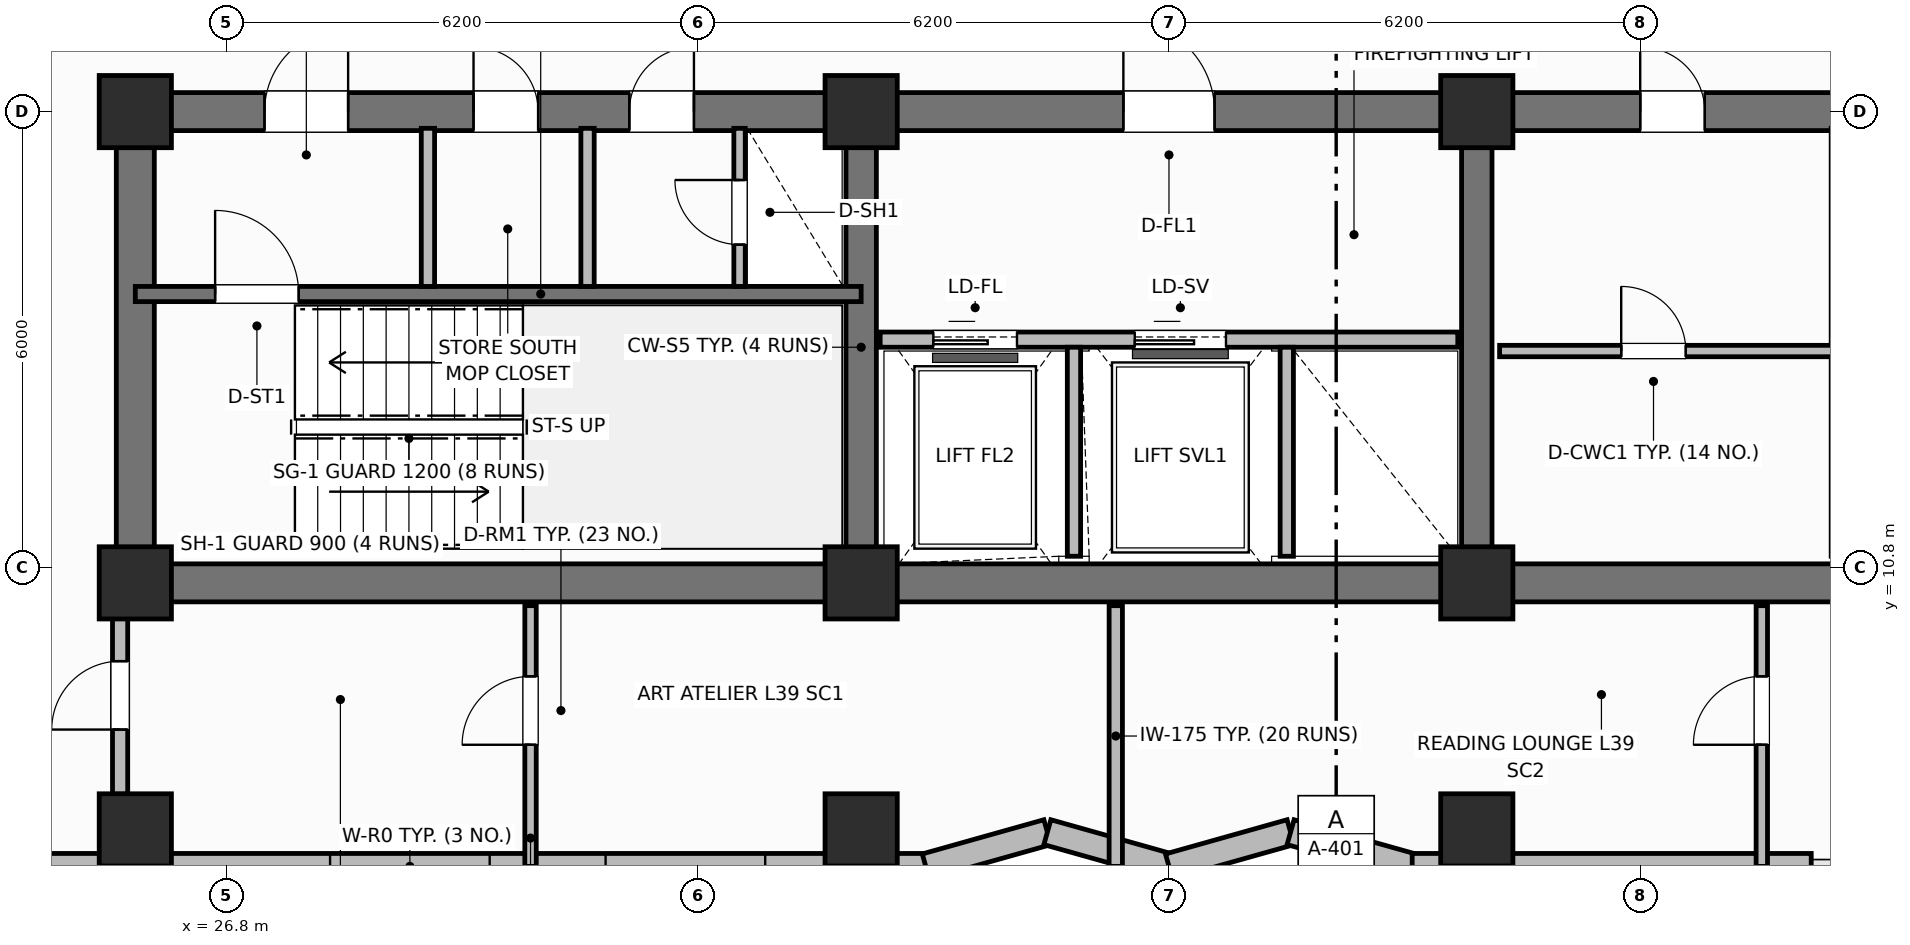
"""IFC4 building model, lengths in metres.
Left out: names, types, materials, properties, quantities, classifications, styles, units other than length and angle.
Written with IfcOpenShell. Run it as: python <this file> out.ifc"""

import sys

from ifc_helpers import new_model, si_unit, direction, frame, frame_2d, origin, origin_2d, place, context, subcontext, project, spatial, rectangle, extrude, element, fill, save


model = new_model("IFC4")
c1 = context("Model", 3, precision=1e-05, world=origin(), true_north=direction((0.0, 1.0)))
c2 = subcontext(c1, "Body", "Model", "MODEL_VIEW")
j1 = project(units=[si_unit("LENGTHUNIT", "METRE"), si_unit("PLANEANGLEUNIT", "RADIAN")], contexts=[c1])
p1 = place(None, origin())
s1 = spatial("IfcSite", under=j1, at=p1, CompositionType="ELEMENT")
p2 = place(p1, origin())
s2 = spatial("IfcBuilding", under=s1, at=p2, CompositionType="ELEMENT")
p3 = place(p2, frame((0.0, 0.0, 158.9)))
s3 = spatial("IfcBuildingStorey", under=s2, at=p3, CompositionType="ELEMENT", Elevation=158.9)
p4 = place(p3, frame((52.8, 10.6, 0.0), z_axis=(0.0, 0.0, 1.0), x_axis=(-1.0, 0.0, 0.0)))
e1 = element("IfcWall", 1, at=p4, inside=s3, PredefinedType="SHEAR", context=c2, shape_type="SweptSolid", body=[
    extrude(rectangle(XDim=27.2, YDim=0.5, at=frame_2d((13.6, 0.0))), origin(), (0.0, 0.0, 1.0), 3.7),
])
p5 = place(p3, frame((25.6, 10.85, 0.0), z_axis=(0.0, 0.0, 1.0), x_axis=(0.0, 1.0, 0.0)))
e2 = element("IfcWall", 2, at=p5, inside=s3, PredefinedType="SHEAR", context=c2, shape_type="SweptSolid", body=[
    extrude(rectangle(XDim=5.7, YDim=0.5, at=frame_2d((2.85, 0.0))), origin(), (0.0, 0.0, 1.0), 3.7),
])
p6 = place(p3, frame((25.6, 16.8, 0.0), z_axis=(0.0, 0.0, 1.0), x_axis=(1.0, 0.0, 0.0)))
e3 = element("IfcWall", 3, at=p6, inside=s3, PredefinedType="SHEAR", context=c2, shape_type="SweptSolid", body=[
    extrude(rectangle(XDim=27.2, YDim=0.5, at=frame_2d((13.6, 0.0))), origin(), (0.0, 0.0, 1.0), 3.7),
])
p7 = place(p6, frame((1.7, 0.0, 0.0)))
e4 = element("IfcOpeningElement", 4, at=p7, cuts=e3, PredefinedType="OPENING", context=c2, shape_type="SweptSolid", body=[
    extrude(rectangle(XDim=1.1, YDim=2.15, at=frame_2d((0.55, 1.075))), frame((0.0, 0.26, 0.0), z_axis=(0.0, -1.0, 0.0), x_axis=(1.0, 0.0, 0.0)), (0.0, 0.0, 1.0), 0.52),
])
p8 = place(p6, frame((4.45, 0.0, 0.0)))
e5 = element("IfcOpeningElement", 5, at=p8, cuts=e3, PredefinedType="OPENING", context=c2, shape_type="SweptSolid", body=[
    extrude(rectangle(XDim=0.85, YDim=2.1, at=frame_2d((0.425, 1.05))), frame((0.0, 0.26, 0.0), z_axis=(0.0, -1.0, 0.0), x_axis=(1.0, 0.0, 0.0)), (0.0, 0.0, 1.0), 0.52),
])
p9 = place(p6, frame((6.5, 0.0, 0.0)))
e6 = element("IfcOpeningElement", 6, at=p9, cuts=e3, PredefinedType="OPENING", context=c2, shape_type="SweptSolid", body=[
    extrude(rectangle(XDim=0.85, YDim=2.1, at=frame_2d((0.425, 1.05))), frame((0.0, 0.26, 0.0), z_axis=(0.0, -1.0, 0.0), x_axis=(1.0, 0.0, 0.0)), (0.0, 0.0, 1.0), 0.52),
])
p10 = place(p6, frame((13.0, 0.0, 0.0)))
e7 = element("IfcOpeningElement", 7, at=p10, cuts=e3, PredefinedType="OPENING", context=c2, shape_type="SweptSolid", body=[
    extrude(rectangle(XDim=1.2, YDim=2.15, at=frame_2d((0.6, 1.075))), frame((0.0, 0.26, 0.0), z_axis=(0.0, -1.0, 0.0), x_axis=(1.0, 0.0, 0.0)), (0.0, 0.0, 1.0), 0.52),
])
p11 = place(p6, frame((19.8, 0.0, 0.0)))
e8 = element("IfcOpeningElement", 8, at=p11, cuts=e3, PredefinedType="OPENING", context=c2, shape_type="SweptSolid", body=[
    extrude(rectangle(XDim=0.85, YDim=2.1, at=frame_2d((0.425, 1.05))), frame((0.0, 0.26, 0.0), z_axis=(0.0, -1.0, 0.0), x_axis=(1.0, 0.0, 0.0)), (0.0, 0.0, 1.0), 0.52),
])
p12 = place(p6, frame((24.2, 0.0, 0.0)))
e9 = element("IfcOpeningElement", 9, at=p12, cuts=e3, PredefinedType="OPENING", context=c2, shape_type="SweptSolid", body=[
    extrude(rectangle(XDim=0.85, YDim=2.1, at=frame_2d((0.425, 1.05))), frame((0.0, 0.26, 0.0), z_axis=(0.0, -1.0, 0.0), x_axis=(1.0, 0.0, 0.0)), (0.0, 0.0, 1.0), 0.52),
])
for number, where, z_axis, x_axis in (
    (10, (35.15, 10.85, 0.0), (0.0, 0.0, 1.0), (0.0, 1.0, 0.0)),
    (11, (43.25, 10.85, 0.0), (0.0, 0.0, 1.0), (0.0, 1.0, 0.0)),
):
    element("IfcWall", number, at=place(p3, frame(where, z_axis=z_axis, x_axis=x_axis)), inside=s3, PredefinedType="SHEAR", context=c2, shape_type="SweptSolid", body=[
        extrude(rectangle(XDim=5.7, YDim=0.4, at=frame_2d((2.85, 0.0))), origin(), (0.0, 0.0, 1.0), 3.7),
    ])
for number, where, z_axis, x_axis in (
    (12, (25.6, 10.6, 0.0), (0.0, 0.0, 1.0), (1.0, 0.0, 0.0)),
    (13, (25.6, 16.8, 0.0), (0.0, 0.0, 1.0), (1.0, 0.0, 0.0)),
    (14, (35.15, 10.6, 0.0), (0.0, 0.0, 1.0), (1.0, 0.0, 0.0)),
    (15, (35.15, 16.8, 0.0), (0.0, 0.0, 1.0), (1.0, 0.0, 0.0)),
    (16, (43.25, 10.6, 0.0), (0.0, 0.0, 1.0), (1.0, 0.0, 0.0)),
    (17, (43.25, 16.8, 0.0), (0.0, 0.0, 1.0), (1.0, 0.0, 0.0)),
    (18, (25.6, 7.35, 0.0), (0.0, 0.0, 1.0), (1.0, 0.0, 0.0)),
    (19, (35.15, 7.35, 0.0), (0.0, 0.0, 1.0), (1.0, 0.0, 0.0)),
    (20, (43.25, 7.35, 0.0), (0.0, 0.0, 1.0), (1.0, 0.0, 0.0)),
):
    element("IfcColumn", number, at=place(p3, frame(where, z_axis=z_axis, x_axis=x_axis)), inside=s3, PredefinedType="COLUMN", context=c2, shape_type="SweptSolid", body=[
        extrude(rectangle(XDim=0.95, YDim=0.95, at=origin_2d()), origin(), (0.0, 0.0, 1.0), 3.7),
    ])
p13 = place(p3, frame((20.2, 6.87, 0.0), z_axis=(0.0, 0.0, 1.0), x_axis=(1.0, 0.0, 0.0)))
e21 = element("IfcWall", 21, at=p13, inside=s3, PredefinedType="SOLIDWALL", context=c2, shape_type="SweptSolid", body=[
    extrude(rectangle(XDim=15.8, YDim=0.34, at=frame_2d((7.9, 0.0))), origin(), (0.0, 0.0, 1.0), 2.72),
])
p14 = place(p13, frame((7.962, 0.0, 0.7)))
e22 = element("IfcOpeningElement", 22, at=p14, cuts=e21, PredefinedType="OPENING", context=c2, shape_type="SweptSolid", body=[
    extrude(rectangle(XDim=2.1, YDim=1.9, at=frame_2d((1.05, 0.95))), frame((0.0, 0.18, 0.0), z_axis=(0.0, -1.0, 0.0), x_axis=(1.0, 0.0, 0.0)), (0.0, 0.0, 1.0), 0.36),
])
p15 = place(p13, frame((11.587, 0.0, 0.7)))
e23 = element("IfcOpeningElement", 23, at=p15, cuts=e21, PredefinedType="OPENING", context=c2, shape_type="SweptSolid", body=[
    extrude(rectangle(XDim=2.1, YDim=1.9, at=frame_2d((1.05, 0.95))), frame((0.0, 0.18, 0.0), z_axis=(0.0, -1.0, 0.0), x_axis=(1.0, 0.0, 0.0)), (0.0, 0.0, 1.0), 0.36),
])
p16 = place(p3, frame((36.0, 6.87, 0.0), z_axis=(0.0, 0.0, 1.0), x_axis=(0.962662902433, 0.270703040766, 0.0)))
e24 = element("IfcWall", 24, at=p16, inside=s3, PredefinedType="SOLIDWALL", context=c2, shape_type="SweptSolid", body=[
    extrude(rectangle(XDim=1.662, YDim=0.34, at=frame_2d((0.831, 0.0))), origin(), (0.0, 0.0, 1.0), 2.72),
])
p17 = place(p3, frame((37.6, 7.32, 0.0), z_axis=(0.0, 0.0, 1.0), x_axis=(0.962652136636, -0.270741322725, 0.0)))
e25 = element("IfcWall", 25, at=p17, inside=s3, PredefinedType="SOLIDWALL", context=c2, shape_type="SweptSolid", body=[
    extrude(rectangle(XDim=1.662, YDim=0.34, at=frame_2d((0.831, 0.0))), origin(), (0.0, 0.0, 1.0), 2.72),
])
p18 = place(p3, frame((39.2, 6.87, 0.0), z_axis=(0.0, 0.0, 1.0), x_axis=(0.962662902433, 0.270703040766, 0.0)))
e26 = element("IfcWall", 26, at=p18, inside=s3, PredefinedType="SOLIDWALL", context=c2, shape_type="SweptSolid", body=[
    extrude(rectangle(XDim=1.662, YDim=0.34, at=frame_2d((0.831, 0.0))), origin(), (0.0, 0.0, 1.0), 2.72),
])
p19 = place(p3, frame((40.8, 7.32, 0.0), z_axis=(0.0, 0.0, 1.0), x_axis=(0.962652136636, -0.270741322725, 0.0)))
e27 = element("IfcWall", 27, at=p19, inside=s3, PredefinedType="SOLIDWALL", context=c2, shape_type="SweptSolid", body=[
    extrude(rectangle(XDim=1.662, YDim=0.34, at=frame_2d((0.831, 0.0))), origin(), (0.0, 0.0, 1.0), 2.72),
])
p20 = place(p3, frame((42.4, 6.87, 0.0), z_axis=(0.0, 0.0, 1.0), x_axis=(1.0, 0.0, 0.0)))
e28 = element("IfcWall", 28, at=p20, inside=s3, PredefinedType="SOLIDWALL", context=c2, shape_type="SweptSolid", body=[
    extrude(rectangle(XDim=5.25, YDim=0.34, at=frame_2d((2.625, 0.0))), origin(), (0.0, 0.0, 1.0), 2.72),
])
p21 = place(p3, frame((25.6, 14.4, 0.0), z_axis=(0.0, 0.0, 1.0), x_axis=(1.0, 0.0, 0.0)))
e29 = element("IfcWall", 29, at=p21, inside=s3, PredefinedType="SHEAR", context=c2, shape_type="SweptSolid", body=[
    extrude(rectangle(XDim=9.55, YDim=0.2, at=frame_2d((4.775, 0.0))), origin(), (0.0, 0.0, 1.0), 3.7),
])
p22 = place(p21, frame((1.05, 0.0, 0.0)))
e30 = element("IfcOpeningElement", 30, at=p22, cuts=e29, PredefinedType="OPENING", context=c2, shape_type="SweptSolid", body=[
    extrude(rectangle(XDim=1.1, YDim=2.15, at=frame_2d((0.55, 1.075))), frame((0.0, 0.11, 0.0), z_axis=(0.0, -1.0, 0.0), x_axis=(1.0, 0.0, 0.0)), (0.0, 0.0, 1.0), 0.22),
])
for number, where, z_axis, x_axis in (
    (31, (29.45, 14.5, 0.0), (0.0, 0.0, 1.0), (0.0, 1.0, 0.0)),
    (32, (31.55, 14.5, 0.0), (0.0, 0.0, 1.0), (0.0, 1.0, 0.0)),
):
    element("IfcWall", number, at=place(p3, frame(where, z_axis=z_axis, x_axis=x_axis)), inside=s3, PredefinedType="PARTITIONING", context=c2, shape_type="SweptSolid", body=[
        extrude(rectangle(XDim=2.08, YDim=0.175, at=frame_2d((1.04, 0.0))), origin(), (0.0, 0.0, 1.0), 2.55),
    ])
p23 = place(p3, frame((33.55, 14.5, 0.0), z_axis=(0.0, 0.0, 1.0), x_axis=(0.0, 1.0, 0.0)))
e33 = element("IfcWall", 33, at=p23, inside=s3, PredefinedType="PARTITIONING", context=c2, shape_type="SweptSolid", body=[
    extrude(rectangle(XDim=2.08, YDim=0.15, at=frame_2d((1.04, 0.0))), origin(), (0.0, 0.0, 1.0), 2.55),
])
p24 = place(p23, frame((0.55, 0.0, 0.0)))
e34 = element("IfcOpeningElement", 34, at=p24, cuts=e33, PredefinedType="OPENING", context=c2, shape_type="SweptSolid", body=[
    extrude(rectangle(XDim=0.85, YDim=2.05, at=frame_2d((0.425, 1.025))), frame((0.0, 0.085, 0.0), z_axis=(0.0, -1.0, 0.0), x_axis=(1.0, 0.0, 0.0)), (0.0, 0.0, 1.0), 0.17),
])
p25 = place(p3, frame((35.4, 13.8, 0.0), z_axis=(0.0, 0.0, 1.0), x_axis=(1.0, 0.0, 0.0)))
e35 = element("IfcWall", 35, at=p25, inside=s3, PredefinedType="PARTITIONING", context=c2, shape_type="SweptSolid", body=[
    extrude(rectangle(XDim=7.6, YDim=0.2, at=frame_2d((3.8, 0.0))), origin(), (0.0, 0.0, 1.0), 2.32),
])
p26 = place(p25, frame((0.7, 0.0, 0.0)))
e36 = element("IfcOpeningElement", 36, at=p26, cuts=e35, PredefinedType="OPENING", context=c2, shape_type="SweptSolid", body=[
    extrude(rectangle(XDim=1.1, YDim=2.15, at=frame_2d((0.55, 1.075))), frame((0.0, 0.11, 0.0), z_axis=(0.0, -1.0, 0.0), x_axis=(1.0, 0.0, 0.0)), (0.0, 0.0, 1.0), 0.22),
])
p27 = place(p25, frame((3.35, 0.0, 0.0)))
e37 = element("IfcOpeningElement", 37, at=p27, cuts=e35, PredefinedType="OPENING", context=c2, shape_type="SweptSolid", body=[
    extrude(rectangle(XDim=1.2, YDim=2.15, at=frame_2d((0.6, 1.075))), frame((0.0, 0.11, 0.0), z_axis=(0.0, -1.0, 0.0), x_axis=(1.0, 0.0, 0.0)), (0.0, 0.0, 1.0), 0.22),
])
for number, where, z_axis, x_axis in (
    (38, (37.95, 10.95, 0.0), (0.0, 0.0, 1.0), (0.0, 1.0, 0.0)),
    (39, (40.75, 10.95, 0.0), (0.0, 0.0, 1.0), (0.0, 1.0, 0.0)),
):
    element("IfcWall", number, at=place(p3, frame(where, z_axis=z_axis, x_axis=x_axis)), inside=s3, PredefinedType="PARTITIONING", context=c2, shape_type="SweptSolid", body=[
        extrude(rectangle(XDim=2.75, YDim=0.175, at=frame_2d((1.375, 0.0))), origin(), (0.0, 0.0, 1.0), 2.55),
    ])
p28 = place(p3, frame((43.55, 13.65, 0.0), z_axis=(0.0, 0.0, 1.0), x_axis=(1.0, 0.0, 0.0)))
e40 = element("IfcWall", 40, at=p28, inside=s3, PredefinedType="PARTITIONING", context=c2, shape_type="SweptSolid", body=[
    extrude(rectangle(XDim=4.4, YDim=0.15, at=frame_2d((2.2, 0.0))), origin(), (0.0, 0.0, 1.0), 2.55),
])
p29 = place(p28, frame((1.6, 0.0, 0.0)))
e41 = element("IfcOpeningElement", 41, at=p29, cuts=e40, PredefinedType="OPENING", context=c2, shape_type="SweptSolid", body=[
    extrude(rectangle(XDim=0.85, YDim=2.1, at=frame_2d((0.425, 1.05))), frame((0.0, 0.085, 0.0), z_axis=(0.0, -1.0, 0.0), x_axis=(1.0, 0.0, 0.0)), (0.0, 0.0, 1.0), 0.17),
])
p30 = place(p3, frame((30.8, 6.87, 0.0), z_axis=(0.0, 0.0, 1.0), x_axis=(0.0, 1.0, 0.0)))
e42 = element("IfcWall", 42, at=p30, inside=s3, PredefinedType="PARTITIONING", context=c2, shape_type="SweptSolid", body=[
    extrude(rectangle(XDim=3.43, YDim=0.15, at=frame_2d((1.715, 0.0))), origin(), (0.0, 0.0, 1.0), 2.55),
])
p31 = place(p30, frame((1.6, 0.0, 0.0)))
e43 = element("IfcOpeningElement", 43, at=p31, cuts=e42, PredefinedType="OPENING", context=c2, shape_type="SweptSolid", body=[
    extrude(rectangle(XDim=0.9, YDim=2.1, at=frame_2d((0.45, 1.05))), frame((0.0, 0.085, 0.0), z_axis=(0.0, -1.0, 0.0), x_axis=(1.0, 0.0, 0.0)), (0.0, 0.0, 1.0), 0.17),
])
p32 = place(p3, frame((38.5, 6.87, 0.0), z_axis=(0.0, 0.0, 1.0), x_axis=(0.0, 1.0, 0.0)))
e44 = element("IfcWall", 44, at=p32, inside=s3, PredefinedType="PARTITIONING", context=c2, shape_type="SweptSolid", body=[
    extrude(rectangle(XDim=3.43, YDim=0.175, at=frame_2d((1.715, 0.0))), origin(), (0.0, 0.0, 1.0), 2.55),
])
p33 = place(p3, frame((47.0, 6.87, 0.0), z_axis=(0.0, 0.0, 1.0), x_axis=(0.0, 1.0, 0.0)))
e45 = element("IfcWall", 45, at=p33, inside=s3, PredefinedType="PARTITIONING", context=c2, shape_type="SweptSolid", body=[
    extrude(rectangle(XDim=3.43, YDim=0.15, at=frame_2d((1.715, 0.0))), origin(), (0.0, 0.0, 1.0), 2.55),
])
p34 = place(p33, frame((1.6, 0.0, 0.0)))
e46 = element("IfcOpeningElement", 46, at=p34, cuts=e45, PredefinedType="OPENING", context=c2, shape_type="SweptSolid", body=[
    extrude(rectangle(XDim=0.9, YDim=2.1, at=frame_2d((0.45, 1.05))), frame((0.0, 0.085, 0.0), z_axis=(0.0, -1.0, 0.0), x_axis=(1.0, 0.0, 0.0)), (0.0, 0.0, 1.0), 0.17),
])
p35 = place(p3, frame((25.4, 7.82, 0.0), z_axis=(0.0, 0.0, 1.0), x_axis=(0.0, 1.0, 0.0)))
e47 = element("IfcWall", 47, at=p35, inside=s3, PredefinedType="PARTITIONING", context=c2, shape_type="SweptSolid", body=[
    extrude(rectangle(XDim=2.48, YDim=0.2, at=frame_2d((1.24, 0.0))), origin(), (0.0, 0.0, 1.0), 2.55),
])
p36 = place(p35, frame((0.85, 0.0, 0.0)))
e48 = element("IfcOpeningElement", 48, at=p36, cuts=e47, PredefinedType="OPENING", context=c2, shape_type="SweptSolid", body=[
    extrude(rectangle(XDim=0.9, YDim=2.1, at=frame_2d((0.45, 1.05))), frame((0.0, 0.11, 0.0), z_axis=(0.0, -1.0, 0.0), x_axis=(1.0, 0.0, 0.0)), (0.0, 0.0, 1.0), 0.22),
])
p37 = place(p14, origin())
e49 = element("IfcWindow", 49, at=p37, inside=s3, PartitioningType="SINGLE_PANEL", PredefinedType="WINDOW", context=c2, shape_type="SweptSolid", body=[
    extrude(rectangle(XDim=2.1, YDim=1.9, at=frame_2d((1.05, 0.95))), frame((0.0, 0.03, 0.0), z_axis=(0.0, -1.0, 0.0), x_axis=(1.0, 0.0, 0.0)), (0.0, 0.0, 1.0), 0.06),
])
fill(e22, e49)
p38 = place(p15, origin())
e50 = element("IfcWindow", 50, at=p38, inside=s3, PartitioningType="SINGLE_PANEL", PredefinedType="WINDOW", context=c2, shape_type="SweptSolid", body=[
    extrude(rectangle(XDim=2.1, YDim=1.9, at=frame_2d((1.05, 0.95))), frame((0.0, 0.03, 0.0), z_axis=(0.0, -1.0, 0.0), x_axis=(1.0, 0.0, 0.0)), (0.0, 0.0, 1.0), 0.06),
])
fill(e23, e50)
p39 = place(p22, origin())
e51 = element("IfcDoor", 51, at=p39, inside=s3, OperationType="SINGLE_SWING_LEFT", PredefinedType="DOOR", context=c2, shape_type="SweptSolid", body=[
    extrude(rectangle(XDim=1.1, YDim=2.15, at=frame_2d((0.55, 1.075))), frame((0.0, 0.025, 0.0), z_axis=(0.0, -1.0, 0.0), x_axis=(1.0, 0.0, 0.0)), (0.0, 0.0, 1.0), 0.05),
])
fill(e30, e51)
p40 = place(p24, origin())
e52 = element("IfcDoor", 52, at=p40, inside=s3, OperationType="SINGLE_SWING_RIGHT", PredefinedType="TRAPDOOR", context=c2, shape_type="SweptSolid", body=[
    extrude(rectangle(XDim=0.85, YDim=2.05, at=frame_2d((0.425, 1.025))), frame((0.0, 0.025, 0.0), z_axis=(0.0, -1.0, 0.0), x_axis=(1.0, 0.0, 0.0)), (0.0, 0.0, 1.0), 0.05),
])
fill(e34, e52)
p41 = place(p26, origin())
e53 = element("IfcDoor", 53, at=p41, inside=s3, OperationType="SLIDING_TO_LEFT", PredefinedType="DOOR", context=c2, shape_type="SweptSolid", body=[
    extrude(rectangle(XDim=1.1, YDim=2.15, at=frame_2d((0.55, 1.075))), frame((0.0, 0.025, 0.0), z_axis=(0.0, -1.0, 0.0), x_axis=(1.0, 0.0, 0.0)), (0.0, 0.0, 1.0), 0.05),
])
fill(e36, e53)
p42 = place(p27, origin())
e54 = element("IfcDoor", 54, at=p42, inside=s3, OperationType="SLIDING_TO_LEFT", PredefinedType="DOOR", context=c2, shape_type="SweptSolid", body=[
    extrude(rectangle(XDim=1.2, YDim=2.15, at=frame_2d((0.6, 1.075))), frame((0.0, 0.025, 0.0), z_axis=(0.0, -1.0, 0.0), x_axis=(1.0, 0.0, 0.0)), (0.0, 0.0, 1.0), 0.05),
])
fill(e37, e54)
p43 = place(p29, origin())
e55 = element("IfcDoor", 55, at=p43, inside=s3, OperationType="SINGLE_SWING_LEFT", PredefinedType="DOOR", context=c2, shape_type="SweptSolid", body=[
    extrude(rectangle(XDim=0.85, YDim=2.1, at=frame_2d((0.425, 1.05))), frame((0.0, 0.025, 0.0), z_axis=(0.0, -1.0, 0.0), x_axis=(1.0, 0.0, 0.0)), (0.0, 0.0, 1.0), 0.05),
])
fill(e41, e55)
p44 = place(p31, origin())
e56 = element("IfcDoor", 56, at=p44, inside=s3, OperationType="SINGLE_SWING_LEFT", PredefinedType="DOOR", context=c2, shape_type="SweptSolid", body=[
    extrude(rectangle(XDim=0.9, YDim=2.1, at=frame_2d((0.45, 1.05))), frame((0.0, 0.025, 0.0), z_axis=(0.0, -1.0, 0.0), x_axis=(1.0, 0.0, 0.0)), (0.0, 0.0, 1.0), 0.05),
])
fill(e43, e56)
p45 = place(p34, origin())
e57 = element("IfcDoor", 57, at=p45, inside=s3, OperationType="SINGLE_SWING_LEFT", PredefinedType="DOOR", context=c2, shape_type="SweptSolid", body=[
    extrude(rectangle(XDim=0.9, YDim=2.1, at=frame_2d((0.45, 1.05))), frame((0.0, 0.025, 0.0), z_axis=(0.0, -1.0, 0.0), x_axis=(1.0, 0.0, 0.0)), (0.0, 0.0, 1.0), 0.05),
])
fill(e46, e57)
p46 = place(p36, origin())
e58 = element("IfcDoor", 58, at=p46, inside=s3, OperationType="SINGLE_SWING_LEFT", PredefinedType="DOOR", context=c2, shape_type="SweptSolid", body=[
    extrude(rectangle(XDim=0.9, YDim=2.1, at=frame_2d((0.45, 1.05))), frame((0.0, 0.025, 0.0), z_axis=(0.0, -1.0, 0.0), x_axis=(1.0, 0.0, 0.0)), (0.0, 0.0, 1.0), 0.05),
])
fill(e48, e58)
p47 = place(p7, origin())
e59 = element("IfcDoor", 59, at=p47, inside=s3, OperationType="SINGLE_SWING_RIGHT", PredefinedType="DOOR", context=c2, shape_type="SweptSolid", body=[
    extrude(rectangle(XDim=1.1, YDim=2.15, at=frame_2d((0.55, 1.075))), frame((0.0, 0.025, 0.0), z_axis=(0.0, -1.0, 0.0), x_axis=(1.0, 0.0, 0.0)), (0.0, 0.0, 1.0), 0.05),
])
fill(e4, e59)
p48 = place(p8, origin())
e60 = element("IfcDoor", 60, at=p48, inside=s3, OperationType="SINGLE_SWING_LEFT", PredefinedType="DOOR", context=c2, shape_type="SweptSolid", body=[
    extrude(rectangle(XDim=0.85, YDim=2.1, at=frame_2d((0.425, 1.05))), frame((0.0, 0.025, 0.0), z_axis=(0.0, -1.0, 0.0), x_axis=(1.0, 0.0, 0.0)), (0.0, 0.0, 1.0), 0.05),
])
fill(e5, e60)
p49 = place(p9, origin())
e61 = element("IfcDoor", 61, at=p49, inside=s3, OperationType="SINGLE_SWING_RIGHT", PredefinedType="DOOR", context=c2, shape_type="SweptSolid", body=[
    extrude(rectangle(XDim=0.85, YDim=2.1, at=frame_2d((0.425, 1.05))), frame((0.0, 0.025, 0.0), z_axis=(0.0, -1.0, 0.0), x_axis=(1.0, 0.0, 0.0)), (0.0, 0.0, 1.0), 0.05),
])
fill(e6, e61)
p50 = place(p10, origin())
e62 = element("IfcDoor", 62, at=p50, inside=s3, OperationType="SINGLE_SWING_LEFT", PredefinedType="DOOR", context=c2, shape_type="SweptSolid", body=[
    extrude(rectangle(XDim=1.2, YDim=2.15, at=frame_2d((0.6, 1.075))), frame((0.0, 0.025, 0.0), z_axis=(0.0, -1.0, 0.0), x_axis=(1.0, 0.0, 0.0)), (0.0, 0.0, 1.0), 0.05),
])
fill(e7, e62)
p51 = place(p11, origin())
e63 = element("IfcDoor", 63, at=p51, inside=s3, OperationType="SINGLE_SWING_LEFT", PredefinedType="DOOR", context=c2, shape_type="SweptSolid", body=[
    extrude(rectangle(XDim=0.85, YDim=2.1, at=frame_2d((0.425, 1.05))), frame((0.0, 0.025, 0.0), z_axis=(0.0, -1.0, 0.0), x_axis=(1.0, 0.0, 0.0)), (0.0, 0.0, 1.0), 0.05),
])
fill(e8, e63)
save(model, sys.argv[1])
